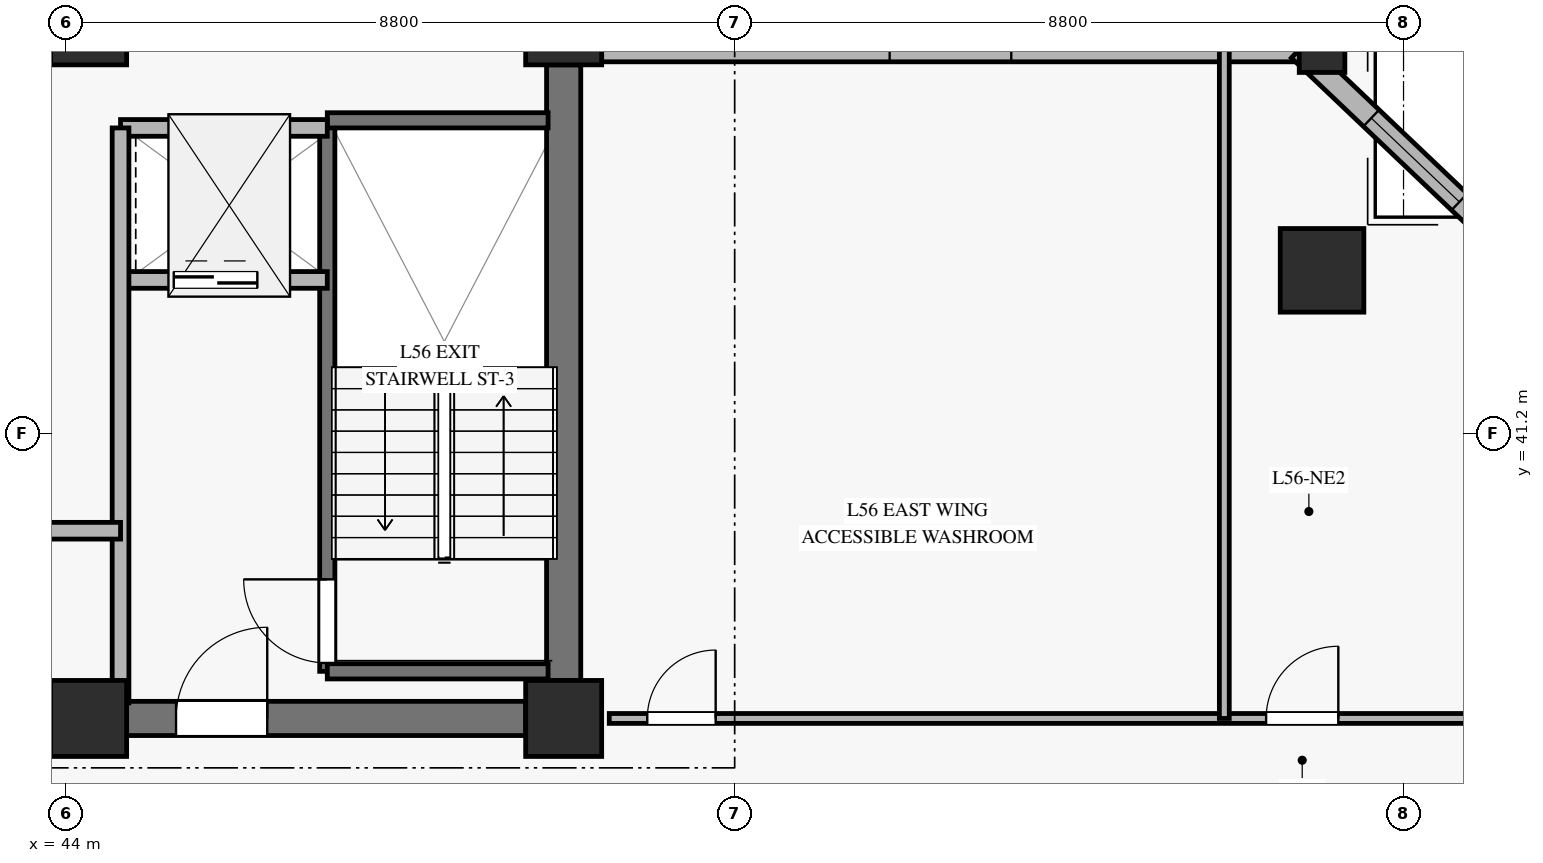
"""IFC4 building model, lengths in metres.
Left out: names, types, materials, properties, quantities, classifications, styles, units other than length and angle.
Written with IfcOpenShell. Run it as: python <this file> out.ifc"""

import sys

from ifc_helpers import new_model, si_unit, direction, frame, frame_2d, origin, origin_2d, place, context, subcontext, project, spatial, rectangle, hollow_rectangle, extrude, source, transform, mapped, element, fill, save


model = new_model("IFC4")
c1 = context("Model", 3, precision=1e-05, world=origin(), true_north=direction((0.0, 1.0)))
c2 = subcontext(c1, "Body", "Model", "MODEL_VIEW")
j1 = project(units=[si_unit("LENGTHUNIT", "METRE"), si_unit("PLANEANGLEUNIT", "RADIAN")], contexts=[c1])
p1 = place(None, origin())
s1 = spatial("IfcSite", under=j1, at=p1, CompositionType="ELEMENT")
p2 = place(p1, origin())
s2 = spatial("IfcBuilding", under=s1, at=p2, CompositionType="ELEMENT")
p3 = place(p2, frame((0.0, 0.0, 220.2)))
s3 = spatial("IfcBuildingStorey", under=s2, at=p3, CompositionType="ELEMENT", Elevation=220.2)
m1 = source(origin(), c2, "Body", "SweptSolid", [
    extrude(rectangle(XDim=1.0, YDim=1.0, at=origin_2d()), origin(), (0.0, 0.0, 1.0), 6.585),
])
for number, where, z_axis, x_axis in (
    (1, (44.3, 37.45, 0.0), (0.0, 0.0, 1.0), (1.0, 0.0, 0.0)),
    (2, (44.3, 46.55, 0.0), (0.0, 0.0, 1.0), (1.0, 0.0, 0.0)),
    (3, (50.55, 37.45, 0.0), (0.0, 0.0, 1.0), (1.0, 0.0, 0.0)),
    (4, (50.55, 46.55, 0.0), (0.0, 0.0, 1.0), (1.0, 0.0, 0.0)),
):
    element("IfcColumn", number, at=place(p3, frame(where, z_axis=z_axis, x_axis=x_axis)), inside=s3, PredefinedType="PILASTER", context=c2, shape_type="MappedRepresentation", body=[
        mapped(m1, transform((0.0, 0.0, 0.0), x_axis=(1.0, 0.0, 0.0), y_axis=(0.0, 1.0, 0.0), z_axis=(0.0, 0.0, 1.0), scale=1.0)),
    ])
p4 = place(p3, frame((44.8, 37.45, 0.0), z_axis=(0.0, 0.0, 1.0), x_axis=(1.0, 0.0, 0.0)))
e5 = element("IfcWall", 5, at=p4, inside=s3, PredefinedType="SHEAR", context=c2, shape_type="SweptSolid", body=[
    extrude(rectangle(XDim=5.25, YDim=0.45, at=frame_2d((2.625, 0.0))), origin(), (0.0, 0.0, 1.0), 6.585),
])
p5 = place(p4, frame((0.65, 0.0, 0.0)))
e6 = element("IfcOpeningElement", 6, at=p5, cuts=e5, PredefinedType="OPENING", context=c2, shape_type="SweptSolid", body=[
    extrude(rectangle(XDim=1.2, YDim=2.15, at=frame_2d((0.6, 1.075))), frame((0.0, 0.235, 0.0), z_axis=(0.0, -1.0, 0.0), x_axis=(1.0, 0.0, 0.0)), (0.0, 0.0, 1.0), 0.47),
])
p6 = place(p3, frame((50.55, 37.95, 0.0), z_axis=(0.0, 0.0, 1.0), x_axis=(0.0, 1.0, 0.0)))
e7 = element("IfcWall", 7, at=p6, inside=s3, PredefinedType="SHEAR", context=c2, shape_type="SweptSolid", body=[
    extrude(rectangle(XDim=8.1, YDim=0.45, at=frame_2d((4.05, 0.0))), origin(), (0.0, 0.0, 1.0), 6.585),
])
m2 = source(origin(), c2, "Body", "SweptSolid", [
    extrude(hollow_rectangle(XDim=1.1, YDim=1.1, WallThickness=0.05, at=origin_2d()), origin(), (0.0, 0.0, 1.0), 6.595),
])
p7 = place(p3, frame((60.528, 43.346, 0.0), z_axis=(-0.055821227607, 0.007144228732, 0.998415219508), x_axis=(-0.126948603569, -0.991909296283, 0.0)))
e8 = element("IfcColumn", 8, at=p7, inside=s3, PredefinedType="COLUMN", context=c2, shape_type="MappedRepresentation", body=[
    mapped(m2, transform((0.0, 0.0, 0.0), x_axis=(1.0, 0.0, 0.0), y_axis=(0.0, 1.0, 0.0), z_axis=(0.0, 0.0, 1.0), scale=1.0)),
])
m3 = source(origin(), c2, "Body", "SweptSolid", [
    extrude(hollow_rectangle(XDim=0.6, YDim=0.6, WallThickness=0.028, at=origin_2d()), origin(), (0.0, 0.0, 1.0), 6.595),
])
p8 = place(p3, frame((60.528, 46.25, 0.0), z_axis=(-0.055822652219, 0.0, 0.998440700041), x_axis=(0.0, -1.0, 0.0)))
e9 = element("IfcColumn", 9, at=p8, inside=s3, PredefinedType="COLUMN", context=c2, shape_type="MappedRepresentation", body=[
    mapped(m3, transform((0.0, 0.0, 0.0), x_axis=(1.0, 0.0, 0.0), y_axis=(0.0, 1.0, 0.0), z_axis=(0.0, 0.0, 1.0), scale=1.0)),
])
p9 = place(p3, frame((51.05, 46.25, 0.0), z_axis=(0.0, 0.0, 1.0), x_axis=(1.0, 0.0, 0.0)))
e10 = element("IfcWall", 10, at=p9, inside=s3, PredefinedType="SOLIDWALL", context=c2, shape_type="SweptSolid", body=[
    extrude(rectangle(XDim=9.178, YDim=0.32, at=frame_2d((4.589, 0.0))), origin(), (0.0, 0.0, 1.0), 6.065),
])
p10 = place(p9, frame((3.789, 0.0, 0.45)))
e11 = element("IfcOpeningElement", 11, at=p10, cuts=e10, PredefinedType="OPENING", context=c2, shape_type="SweptSolid", body=[
    extrude(rectangle(XDim=1.6, YDim=2.0, at=frame_2d((0.8, 1.0))), frame((0.0, 0.17, 0.0), z_axis=(0.0, -1.0, 0.0), x_axis=(1.0, 0.0, 0.0)), (0.0, 0.0, 1.0), 0.34),
])
p11 = place(p3, frame((63.282, 43.346, 0.0), z_axis=(0.0, 0.0, 1.0), x_axis=(-0.724668126372, 0.689098038468, 0.0)))
e12 = element("IfcWall", 12, at=p11, inside=s3, PredefinedType="SOLIDWALL", context=c2, shape_type="SweptSolid", body=[
    extrude(rectangle(XDim=4.214, YDim=0.3, at=frame_2d((2.107, 0.0))), origin(), (0.0, 0.0, 1.0), 6.065),
])
p12 = place(p11, frame((1.307, 0.0, 0.45)))
e13 = element("IfcOpeningElement", 13, at=p12, cuts=e12, PredefinedType="OPENING", context=c2, shape_type="SweptSolid", body=[
    extrude(rectangle(XDim=1.6, YDim=2.0, at=frame_2d((0.8, 1.0))), frame((0.0, 0.16, 0.0), z_axis=(0.0, -1.0, 0.0), x_axis=(1.0, 0.0, 0.0)), (0.0, 0.0, 1.0), 0.32),
])
p13 = place(p3, frame((47.44, 38.07, 0.0), z_axis=(0.0, 0.0, 1.0), x_axis=(0.0, 1.0, 0.0)))
e14 = element("IfcWall", 14, at=p13, inside=s3, PredefinedType="SOLIDWALL", context=c2, shape_type="SweptSolid", body=[
    extrude(rectangle(XDim=7.25, YDim=0.2, at=frame_2d((3.625, 0.0))), origin(), (0.0, 0.0, 1.0), 6.8),
])
p14 = place(p13, frame((0.11, 0.0, 0.0)))
e15 = element("IfcOpeningElement", 15, at=p14, cuts=e14, PredefinedType="OPENING", context=c2, shape_type="SweptSolid", body=[
    extrude(rectangle(XDim=1.1, YDim=2.15, at=frame_2d((0.55, 1.075))), frame((0.0, 0.11, 0.0), z_axis=(0.0, -1.0, 0.0), x_axis=(1.0, 0.0, 0.0)), (0.0, 0.0, 1.0), 0.22),
])
for number, where, z_axis, x_axis in (
    (16, (47.44, 45.32, 0.0), (0.0, 0.0, 1.0), (1.0, 0.0, 0.0)),
    (17, (47.44, 38.07, 0.0), (0.0, 0.0, 1.0), (1.0, 0.0, 0.0)),
):
    element("IfcWall", number, at=place(p3, frame(where, z_axis=z_axis, x_axis=x_axis)), inside=s3, PredefinedType="SOLIDWALL", context=c2, shape_type="SweptSolid", body=[
        extrude(rectangle(XDim=2.905, YDim=0.2, at=frame_2d((1.453, 0.0))), origin(), (0.0, 0.0, 1.0), 6.8),
    ])
p15 = place(p3, frame((44.72, 43.22, 0.0), z_axis=(0.0, 0.0, 1.0), x_axis=(1.0, 0.0, 0.0)))
e18 = element("IfcWall", 18, at=p15, inside=s3, PredefinedType="SOLIDWALL", context=c2, shape_type="SweptSolid", body=[
    extrude(rectangle(XDim=2.72, YDim=0.22, at=frame_2d((1.36, 0.0))), origin(), (0.0, 0.0, 1.0), 6.585),
])
p16 = place(p15, frame((0.7, 0.0, 0.0)))
e19 = element("IfcOpeningElement", 19, at=p16, cuts=e18, PredefinedType="OPENING", context=c2, shape_type="SweptSolid", body=[
    extrude(rectangle(XDim=1.1, YDim=2.2, at=frame_2d((0.55, 1.1))), frame((0.0, 0.12, 0.0), z_axis=(0.0, -1.0, 0.0), x_axis=(1.0, 0.0, 0.0)), (0.0, 0.0, 1.0), 0.24),
])
p17 = place(p3, frame((44.72, 45.22, 0.0), z_axis=(0.0, 0.0, 1.0), x_axis=(1.0, 0.0, 0.0)))
e20 = element("IfcWall", 20, at=p17, inside=s3, PredefinedType="SOLIDWALL", context=c2, shape_type="SweptSolid", body=[
    extrude(rectangle(XDim=2.72, YDim=0.22, at=frame_2d((1.36, 0.0))), origin(), (0.0, 0.0, 1.0), 6.585),
])
p18 = place(p3, frame((44.72, 37.655, 0.0), z_axis=(0.0, 0.0, 1.0), x_axis=(0.0, 1.0, 0.0)))
e21 = element("IfcWall", 21, at=p18, inside=s3, PredefinedType="SOLIDWALL", context=c2, shape_type="SweptSolid", body=[
    extrude(rectangle(XDim=7.565, YDim=0.22, at=frame_2d((3.782, 0.0))), origin(), (0.0, 0.0, 1.0), 6.585),
])
p19 = place(p3, frame((36.12, 39.92, 0.0), z_axis=(0.0, 0.0, 1.0), x_axis=(1.0, 0.0, 0.0)))
e22 = element("IfcWall", 22, at=p19, inside=s3, PredefinedType="SOLIDWALL", context=c2, shape_type="SweptSolid", body=[
    extrude(rectangle(XDim=8.6, YDim=0.22, at=frame_2d((4.3, 0.0))), origin(), (0.0, 0.0, 1.0), 5.87),
])
p20 = place(p3, frame((51.15, 37.45, 0.0), z_axis=(0.0, 0.0, 1.0), x_axis=(1.0, 0.0, 0.0)))
e23 = element("IfcWall", 23, at=p20, inside=s3, PredefinedType="PARTITIONING", context=c2, shape_type="SweptSolid", body=[
    extrude(rectangle(XDim=12.132, YDim=0.13, at=frame_2d((6.066, 0.0))), origin(), (0.0, 0.0, 1.0), 6.07),
])
p21 = place(p20, frame((0.5, 0.0, 0.0)))
e24 = element("IfcOpeningElement", 24, at=p21, cuts=e23, PredefinedType="OPENING", context=c2, shape_type="SweptSolid", body=[
    extrude(rectangle(XDim=0.9, YDim=2.1, at=frame_2d((0.45, 1.05))), frame((0.0, 0.075, 0.0), z_axis=(0.0, -1.0, 0.0), x_axis=(1.0, 0.0, 0.0)), (0.0, 0.0, 1.0), 0.15),
])
p22 = place(p20, frame((8.642, 0.0, 0.0)))
e25 = element("IfcOpeningElement", 25, at=p22, cuts=e23, PredefinedType="OPENING", context=c2, shape_type="SweptSolid", body=[
    extrude(rectangle(XDim=0.95, YDim=2.1, at=frame_2d((0.475, 1.05))), frame((0.0, 0.075, 0.0), z_axis=(0.0, -1.0, 0.0), x_axis=(1.0, 0.0, 0.0)), (0.0, 0.0, 1.0), 0.15),
])
p23 = place(p3, frame((59.242, 37.45, 0.0), z_axis=(0.0, 0.0, 1.0), x_axis=(0.0, 1.0, 0.0)))
e26 = element("IfcWall", 26, at=p23, inside=s3, PredefinedType="PARTITIONING", context=c2, shape_type="SweptSolid", body=[
    extrude(rectangle(XDim=8.8, YDim=0.13, at=frame_2d((4.4, 0.0))), origin(), (0.0, 0.0, 1.0), 6.07),
])
m4 = source(origin(), c2, "Body", "SweptSolid", [
    extrude(rectangle(XDim=1.6, YDim=2.0, at=frame_2d((0.8, 1.0))), frame((0.0, 0.03, 0.0), z_axis=(0.0, -1.0, 0.0), x_axis=(1.0, 0.0, 0.0)), (0.0, 0.0, 1.0), 0.06),
])
p24 = place(p12, origin())
e27 = element("IfcWindow", 27, at=p24, inside=s3, PartitioningType="SINGLE_PANEL", PredefinedType="WINDOW", context=c2, shape_type="MappedRepresentation", body=[
    mapped(m4, transform((0.0, 0.0, 0.0), x_axis=(1.0, 0.0, 0.0), y_axis=(0.0, 1.0, 0.0), z_axis=(0.0, 0.0, 1.0), scale=1.0)),
])
fill(e13, e27)
m5 = source(origin(), c2, "Body", "SweptSolid", [
    extrude(rectangle(XDim=1.1, YDim=2.15, at=frame_2d((0.55, 1.075))), frame((0.0, 0.025, 0.0), z_axis=(0.0, -1.0, 0.0), x_axis=(1.0, 0.0, 0.0)), (0.0, 0.0, 1.0), 0.05),
])
p25 = place(p14, origin())
e28 = element("IfcDoor", 28, at=p25, inside=s3, OperationType="SINGLE_SWING_RIGHT", PredefinedType="DOOR", context=c2, shape_type="MappedRepresentation", body=[
    mapped(m5, transform((0.0, 0.0, 0.0), x_axis=(1.0, 0.0, 0.0), y_axis=(0.0, 1.0, 0.0), z_axis=(0.0, 0.0, 1.0), scale=1.0)),
])
fill(e15, e28)
m6 = source(origin(), c2, "Body", "SweptSolid", [
    extrude(rectangle(XDim=1.1, YDim=2.2, at=frame_2d((0.55, 1.1))), frame((0.0, 0.025, 0.0), z_axis=(0.0, -1.0, 0.0), x_axis=(1.0, 0.0, 0.0)), (0.0, 0.0, 1.0), 0.05),
])
p26 = place(p16, origin())
e29 = element("IfcDoor", 29, at=p26, inside=s3, OperationType="SLIDING_TO_LEFT", PredefinedType="DOOR", context=c2, shape_type="MappedRepresentation", body=[
    mapped(m6, transform((0.0, 0.0, 0.0), x_axis=(1.0, 0.0, 0.0), y_axis=(0.0, 1.0, 0.0), z_axis=(0.0, 0.0, 1.0), scale=1.0)),
])
fill(e19, e29)
m7 = source(origin(), c2, "Body", "SweptSolid", [
    extrude(rectangle(XDim=1.2, YDim=2.15, at=frame_2d((0.6, 1.075))), frame((0.0, 0.025, 0.0), z_axis=(0.0, -1.0, 0.0), x_axis=(1.0, 0.0, 0.0)), (0.0, 0.0, 1.0), 0.05),
])
p27 = place(p5, origin())
e30 = element("IfcDoor", 30, at=p27, inside=s3, OperationType="SINGLE_SWING_RIGHT", PredefinedType="DOOR", context=c2, shape_type="MappedRepresentation", body=[
    mapped(m7, transform((0.0, 0.0, 0.0), x_axis=(1.0, 0.0, 0.0), y_axis=(0.0, 1.0, 0.0), z_axis=(0.0, 0.0, 1.0), scale=1.0)),
])
fill(e6, e30)
m8 = source(origin(), c2, "Body", "SweptSolid", [
    extrude(rectangle(XDim=0.9, YDim=2.1, at=frame_2d((0.45, 1.05))), frame((0.0, 0.025, 0.0), z_axis=(0.0, -1.0, 0.0), x_axis=(1.0, 0.0, 0.0)), (0.0, 0.0, 1.0), 0.05),
])
p28 = place(p21, origin())
e31 = element("IfcDoor", 31, at=p28, inside=s3, OperationType="SINGLE_SWING_RIGHT", PredefinedType="DOOR", context=c2, shape_type="MappedRepresentation", body=[
    mapped(m8, transform((0.0, 0.0, 0.0), x_axis=(1.0, 0.0, 0.0), y_axis=(0.0, 1.0, 0.0), z_axis=(0.0, 0.0, 1.0), scale=1.0)),
])
fill(e24, e31)
m9 = source(origin(), c2, "Body", "SweptSolid", [
    extrude(rectangle(XDim=0.95, YDim=2.1, at=frame_2d((0.475, 1.05))), frame((0.0, 0.025, 0.0), z_axis=(0.0, -1.0, 0.0), x_axis=(1.0, 0.0, 0.0)), (0.0, 0.0, 1.0), 0.05),
])
p29 = place(p22, origin())
e32 = element("IfcDoor", 32, at=p29, inside=s3, OperationType="SINGLE_SWING_RIGHT", PredefinedType="DOOR", context=c2, shape_type="MappedRepresentation", body=[
    mapped(m9, transform((0.0, 0.0, 0.0), x_axis=(1.0, 0.0, 0.0), y_axis=(0.0, 1.0, 0.0), z_axis=(0.0, 0.0, 1.0), scale=1.0)),
])
fill(e25, e32)
save(model, sys.argv[1])
